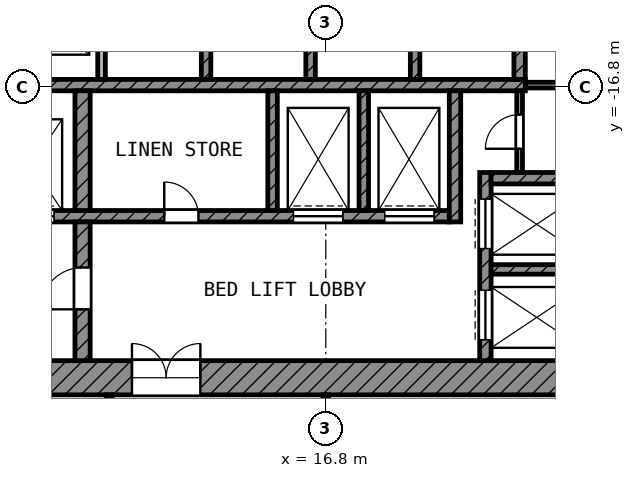
"""IFC4 building model, lengths in metres.
Left out: names, types, materials, properties, quantities, classifications, styles, units other than length and angle.
Written with IfcOpenShell. Run it as: python <this file> out.ifc"""

import sys

from ifc_helpers import new_model, si_unit, direction, frame, frame_2d, origin, place, context, subcontext, project, spatial, rectangle, extrude, element, fill, save


model = new_model("IFC4")
c1 = context("Model", 3, precision=1e-05, world=origin(), true_north=direction((0.0, 1.0)))
c2 = subcontext(c1, "Body", "Model", "MODEL_VIEW")
j1 = project(units=[si_unit("LENGTHUNIT", "METRE"), si_unit("PLANEANGLEUNIT", "RADIAN")], contexts=[c1])
p1 = place(None, origin())
s1 = spatial("IfcSite", under=j1, at=p1, CompositionType="ELEMENT")
p2 = place(p1, origin())
s2 = spatial("IfcBuilding", under=s1, at=p2, CompositionType="ELEMENT")
p3 = place(p2, frame((0.0, 0.0, 204.6)))
s3 = spatial("IfcBuildingStorey", under=s2, at=p3, CompositionType="ELEMENT", Elevation=204.6)
p4 = place(p3, frame((5.4, -24.45, 0.0), z_axis=(0.0, 0.0, 1.0), x_axis=(1.0, 0.0, 0.0)))
e1 = element("IfcWall", 1, at=p4, inside=s3, PredefinedType="SHEAR", context=c2, shape_type="SweptSolid", body=[
    extrude(rectangle(XDim=18.6, YDim=0.9, at=frame_2d((9.3, 0.0))), origin(), (0.0, 0.0, 1.0), 3.6),
])
p5 = place(p4, frame((6.3, 0.0, 0.0)))
e2 = element("IfcOpeningElement", 2, at=p5, cuts=e1, PredefinedType="OPENING", context=c2, shape_type="SweptSolid", body=[
    extrude(rectangle(XDim=1.8, YDim=2.1, at=frame_2d((0.9, 1.05))), frame((0.0, 0.46, 0.0), z_axis=(0.0, -1.0, 0.0), x_axis=(1.0, 0.0, 0.0)), (0.0, 0.0, 1.0), 0.92),
])
p6 = place(p3, frame((5.4, -16.75, 0.0), z_axis=(0.0, 0.0, 1.0), x_axis=(1.0, 0.0, 0.0)))
e3 = element("IfcWall", 3, at=p6, inside=s3, PredefinedType="SHEAR", context=c2, shape_type="SweptSolid", body=[
    extrude(rectangle(XDim=16.65, YDim=0.3, at=frame_2d((8.325, 0.0))), origin(), (0.0, 0.0, 1.0), 3.6),
])
p7 = place(p3, frame((5.4, -20.2, 0.0), z_axis=(0.0, 0.0, 1.0), x_axis=(1.0, 0.0, 0.0)))
e4 = element("IfcWall", 4, at=p7, inside=s3, PredefinedType="SHEAR", context=c2, shape_type="SweptSolid", body=[
    extrude(rectangle(XDim=14.65, YDim=0.3, at=frame_2d((7.325, 0.0))), origin(), (0.0, 0.0, 1.0), 3.6),
])
p8 = place(p7, frame((10.55, 0.0, 0.0)))
e5 = element("IfcOpeningElement", 5, at=p8, cuts=e4, PredefinedType="OPENING", context=c2, shape_type="SweptSolid", body=[
    extrude(rectangle(XDim=1.3, YDim=2.1, at=frame_2d((0.65, 1.05))), frame((0.0, 0.16, 0.0), z_axis=(0.0, -1.0, 0.0), x_axis=(1.0, 0.0, 0.0)), (0.0, 0.0, 1.0), 0.32),
])
p9 = place(p7, frame((12.95, 0.0, 0.0)))
e6 = element("IfcOpeningElement", 6, at=p9, cuts=e4, PredefinedType="OPENING", context=c2, shape_type="SweptSolid", body=[
    extrude(rectangle(XDim=1.3, YDim=2.1, at=frame_2d((0.65, 1.05))), frame((0.0, 0.16, 0.0), z_axis=(0.0, -1.0, 0.0), x_axis=(1.0, 0.0, 0.0)), (0.0, 0.0, 1.0), 0.32),
])
p10 = place(p7, frame((0.55, 0.0, 0.0)))
e7 = element("IfcOpeningElement", 7, at=p10, cuts=e4, PredefinedType="OPENING", context=c2, shape_type="SweptSolid", body=[
    extrude(rectangle(XDim=1.3, YDim=2.1, at=frame_2d((0.65, 1.05))), frame((0.0, 0.16, 0.0), z_axis=(0.0, -1.0, 0.0), x_axis=(1.0, 0.0, 0.0)), (0.0, 0.0, 1.0), 0.32),
])
p11 = place(p7, frame((2.95, 0.0, 0.0)))
e8 = element("IfcOpeningElement", 8, at=p11, cuts=e4, PredefinedType="OPENING", context=c2, shape_type="SweptSolid", body=[
    extrude(rectangle(XDim=1.3, YDim=2.1, at=frame_2d((0.65, 1.05))), frame((0.0, 0.16, 0.0), z_axis=(0.0, -1.0, 0.0), x_axis=(1.0, 0.0, 0.0)), (0.0, 0.0, 1.0), 0.32),
])
p12 = place(p7, frame((7.15, 0.0, 0.0)))
e9 = element("IfcOpeningElement", 9, at=p12, cuts=e4, PredefinedType="OPENING", context=c2, shape_type="SweptSolid", body=[
    extrude(rectangle(XDim=0.9, YDim=2.1, at=frame_2d((0.45, 1.05))), frame((0.0, 0.16, 0.0), z_axis=(0.0, -1.0, 0.0), x_axis=(1.0, 0.0, 0.0)), (0.0, 0.0, 1.0), 0.32),
])
p13 = place(p3, frame((10.4, -24.0, 0.0), z_axis=(0.0, 0.0, 1.0), x_axis=(0.0, 1.0, 0.0)))
e10 = element("IfcWall", 10, at=p13, inside=s3, PredefinedType="SHEAR", context=c2, shape_type="SweptSolid", body=[
    extrude(rectangle(XDim=3.65, YDim=0.4, at=frame_2d((1.825, 0.0))), origin(), (0.0, 0.0, 1.0), 3.6),
])
p14 = place(p13, frame((1.35, 0.0, 0.0)))
e11 = element("IfcOpeningElement", 11, at=p14, cuts=e10, PredefinedType="OPENING", context=c2, shape_type="SweptSolid", body=[
    extrude(rectangle(XDim=1.1, YDim=2.1, at=frame_2d((0.55, 1.05))), frame((0.0, 0.21, 0.0), z_axis=(0.0, -1.0, 0.0), x_axis=(1.0, 0.0, 0.0)), (0.0, 0.0, 1.0), 0.42),
])
p15 = place(p3, frame((10.4, -20.05, 0.0), z_axis=(0.0, 0.0, 1.0), x_axis=(0.0, 1.0, 0.0)))
e12 = element("IfcWall", 12, at=p15, inside=s3, PredefinedType="SHEAR", context=c2, shape_type="SweptSolid", body=[
    extrude(rectangle(XDim=3.15, YDim=0.4, at=frame_2d((1.575, 0.0))), origin(), (0.0, 0.0, 1.0), 3.6),
])
p16 = place(p3, frame((20.2, -20.35, 0.0), z_axis=(0.0, 0.0, 1.0), x_axis=(0.0, 1.0, 0.0)))
e13 = element("IfcWall", 13, at=p16, inside=s3, PredefinedType="SHEAR", context=c2, shape_type="SweptSolid", body=[
    extrude(rectangle(XDim=3.45, YDim=0.3, at=frame_2d((1.725, 0.0))), origin(), (0.0, 0.0, 1.0), 3.6),
])
p17 = place(p3, frame((21.9, -16.6, 0.0), z_axis=(0.0, 0.0, 1.0), x_axis=(0.0, 1.0, 0.0)))
e14 = element("IfcWall", 14, at=p17, inside=s3, PredefinedType="SHEAR", context=c2, shape_type="SweptSolid", body=[
    extrude(rectangle(XDim=2.35, YDim=0.3, at=frame_2d((1.175, 0.0))), origin(), (0.0, 0.0, 1.0), 3.6),
])
p18 = place(p3, frame((21.15, -19.2, 0.0), z_axis=(0.0, 0.0, 1.0), x_axis=(1.0, 0.0, 0.0)))
e15 = element("IfcWall", 15, at=p18, inside=s3, PredefinedType="SHEAR", context=c2, shape_type="SweptSolid", body=[
    extrude(rectangle(XDim=2.85, YDim=0.3, at=frame_2d((1.425, 0.0))), origin(), (0.0, 0.0, 1.0), 3.6),
])
p19 = place(p3, frame((21.0, -24.0, 0.0), z_axis=(0.0, 0.0, 1.0), x_axis=(0.0, 1.0, 0.0)))
e16 = element("IfcWall", 16, at=p19, inside=s3, PredefinedType="SHEAR", context=c2, shape_type="SweptSolid", body=[
    extrude(rectangle(XDim=4.95, YDim=0.3, at=frame_2d((2.475, 0.0))), origin(), (0.0, 0.0, 1.0), 3.6),
])
p20 = place(p19, frame((2.95, 0.0, 0.0)))
e17 = element("IfcOpeningElement", 17, at=p20, cuts=e16, PredefinedType="OPENING", context=c2, shape_type="SweptSolid", body=[
    extrude(rectangle(XDim=1.3, YDim=2.1, at=frame_2d((0.65, 1.05))), frame((0.0, 0.16, 0.0), z_axis=(0.0, -1.0, 0.0), x_axis=(1.0, 0.0, 0.0)), (0.0, 0.0, 1.0), 0.32),
])
p21 = place(p19, frame((0.55, 0.0, 0.0)))
e18 = element("IfcOpeningElement", 18, at=p21, cuts=e16, PredefinedType="OPENING", context=c2, shape_type="SweptSolid", body=[
    extrude(rectangle(XDim=1.3, YDim=2.1, at=frame_2d((0.65, 1.05))), frame((0.0, 0.16, 0.0), z_axis=(0.0, -1.0, 0.0), x_axis=(1.0, 0.0, 0.0)), (0.0, 0.0, 1.0), 0.32),
])
p22 = place(p3, frame((21.15, -21.6, 0.0), z_axis=(0.0, 0.0, 1.0), x_axis=(1.0, 0.0, 0.0)))
e19 = element("IfcWall", 19, at=p22, inside=s3, PredefinedType="SHEAR", context=c2, shape_type="SweptSolid", body=[
    extrude(rectangle(XDim=2.85, YDim=0.25, at=frame_2d((1.425, 0.0))), origin(), (0.0, 0.0, 1.0), 3.6),
])
for number, where, z_axis, x_axis in (
    (20, (15.4, -20.05, 0.0), (0.0, 0.0, 1.0), (0.0, 1.0, 0.0)),
    (21, (17.8, -20.05, 0.0), (0.0, 0.0, 1.0), (0.0, 1.0, 0.0)),
):
    element("IfcWall", number, at=place(p3, frame(where, z_axis=z_axis, x_axis=x_axis)), inside=s3, PredefinedType="SHEAR", context=c2, shape_type="SweptSolid", body=[
        extrude(rectangle(XDim=3.15, YDim=0.25, at=frame_2d((1.575, 0.0))), origin(), (0.0, 0.0, 1.0), 3.6),
    ])
p23 = place(p3, frame((10.9, -16.6, 0.0), z_axis=(0.0, 0.0, 1.0), x_axis=(0.0, 1.0, 0.0)))
e22 = element("IfcWall", 22, at=p23, inside=s3, PredefinedType="PARTITIONING", context=c2, shape_type="SweptSolid", body=[
    extrude(rectangle(XDim=2.35, YDim=0.2, at=frame_2d((1.175, 0.0))), origin(), (0.0, 0.0, 1.0), 3.6),
])
for number, where, z_axis, x_axis in (
    (23, (13.65, -16.6, 0.0), (0.0, 0.0, 1.0), (0.0, 1.0, 0.0)),
    (24, (16.4, -16.6, 0.0), (0.0, 0.0, 1.0), (0.0, 1.0, 0.0)),
    (25, (19.15, -16.6, 0.0), (0.0, 0.0, 1.0), (0.0, 1.0, 0.0)),
):
    element("IfcWall", number, at=place(p3, frame(where, z_axis=z_axis, x_axis=x_axis)), inside=s3, PredefinedType="SHEAR", context=c2, shape_type="SweptSolid", body=[
        extrude(rectangle(XDim=2.35, YDim=0.25, at=frame_2d((1.175, 0.0))), origin(), (0.0, 0.0, 1.0), 3.6),
    ])
p24 = place(p3, frame((21.9, -19.05, 0.0), z_axis=(0.0, 0.0, 1.0), x_axis=(0.0, 1.0, 0.0)))
e26 = element("IfcWall", 26, at=p24, inside=s3, PredefinedType="PARTITIONING", context=c2, shape_type="SweptSolid", body=[
    extrude(rectangle(XDim=2.15, YDim=0.15, at=frame_2d((1.075, 0.0))), origin(), (0.0, 0.0, 1.0), 3.6),
])
p25 = place(p24, frame((0.625, 0.0, 0.0)))
e27 = element("IfcOpeningElement", 27, at=p25, cuts=e26, PredefinedType="OPENING", context=c2, shape_type="SweptSolid", body=[
    extrude(rectangle(XDim=0.9, YDim=2.1, at=frame_2d((0.45, 1.05))), frame((0.0, 0.085, 0.0), z_axis=(0.0, -1.0, 0.0), x_axis=(1.0, 0.0, 0.0)), (0.0, 0.0, 1.0), 0.17),
])
p26 = place(p3, frame((22.05, -16.75, 0.0), z_axis=(0.0, 0.0, 1.0), x_axis=(1.0, 0.0, 0.0)))
e28 = element("IfcWall", 28, at=p26, inside=s3, PredefinedType="PARTITIONING", context=c2, shape_type="SweptSolid", body=[
    extrude(rectangle(XDim=1.95, YDim=0.15, at=frame_2d((0.975, 0.0))), origin(), (0.0, 0.0, 1.0), 3.6),
])
p27 = place(p3, frame((11.1, -29.399, 0.0), z_axis=(0.0, 0.0, 1.0), x_axis=(0.0, 1.0, 0.0)))
e29 = element("IfcWall", 29, at=p27, inside=s3, PredefinedType="PARTITIONING", context=c2, shape_type="SweptSolid", body=[
    extrude(rectangle(XDim=4.499, YDim=0.15, at=frame_2d((2.25, 0.0))), origin(), (0.0, 0.0, 1.0), 3.6),
])
p28 = place(p3, frame((16.8, -54.52, 0.0), z_axis=(0.0, 0.0, 1.0), x_axis=(0.0, 1.0, 0.0)))
e30 = element("IfcWall", 30, at=p28, inside=s3, PredefinedType="PARTITIONING", context=c2, shape_type="SweptSolid", body=[
    extrude(rectangle(XDim=29.62, YDim=0.15, at=frame_2d((14.81, 0.0))), origin(), (0.0, 0.0, 1.0), 3.6),
])
p29 = place(p28, frame((21.52, 0.0, 0.0)))
e31 = element("IfcOpeningElement", 31, at=p29, cuts=e30, PredefinedType="OPENING", context=c2, shape_type="SweptSolid", body=[
    extrude(rectangle(XDim=1.2, YDim=2.1, at=frame_2d((0.6, 1.05))), frame((0.0, 0.085, 0.0), z_axis=(0.0, -1.0, 0.0), x_axis=(1.0, 0.0, 0.0)), (0.0, 0.0, 1.0), 0.17),
])
p30 = place(p28, frame((10.76, 0.0, 0.0)))
e32 = element("IfcOpeningElement", 32, at=p30, cuts=e30, PredefinedType="OPENING", context=c2, shape_type="SweptSolid", body=[
    extrude(rectangle(XDim=1.2, YDim=2.1, at=frame_2d((0.6, 1.05))), frame((0.0, 0.085, 0.0), z_axis=(0.0, -1.0, 0.0), x_axis=(1.0, 0.0, 0.0)), (0.0, 0.0, 1.0), 0.17),
])
p31 = place(p28, frame((9.2, 0.0, 0.0)))
e33 = element("IfcOpeningElement", 33, at=p31, cuts=e30, PredefinedType="OPENING", context=c2, shape_type="SweptSolid", body=[
    extrude(rectangle(XDim=1.2, YDim=2.1, at=frame_2d((0.6, 1.05))), frame((0.0, 0.085, 0.0), z_axis=(0.0, -1.0, 0.0), x_axis=(1.0, 0.0, 0.0)), (0.0, 0.0, 1.0), 0.17),
])
p32 = place(p28, frame((7.99, 0.0, 0.0)))
e34 = element("IfcOpeningElement", 34, at=p32, cuts=e30, PredefinedType="OPENING", context=c2, shape_type="SweptSolid", body=[
    extrude(rectangle(XDim=0.9, YDim=2.1, at=frame_2d((0.45, 1.05))), frame((0.0, 0.085, 0.0), z_axis=(0.0, -1.0, 0.0), x_axis=(1.0, 0.0, 0.0)), (0.0, 0.0, 1.0), 0.17),
])
p33 = place(p28, frame((2.07, 0.0, 0.0)))
e35 = element("IfcOpeningElement", 35, at=p33, cuts=e30, PredefinedType="OPENING", context=c2, shape_type="SweptSolid", body=[
    extrude(rectangle(XDim=1.5, YDim=2.1, at=frame_2d((0.75, 1.05))), frame((0.0, 0.085, 0.0), z_axis=(0.0, -1.0, 0.0), x_axis=(1.0, 0.0, 0.0)), (0.0, 0.0, 1.0), 0.17),
])
p34 = place(p20, origin())
e36 = element("IfcDoor", 36, at=p34, inside=s3, OperationType="DOUBLE_DOOR_SLIDING", PredefinedType="DOOR", context=c2, shape_type="SweptSolid", body=[
    extrude(rectangle(XDim=1.3, YDim=2.1, at=frame_2d((0.65, 1.05))), frame((0.0, 0.025, 0.0), z_axis=(0.0, -1.0, 0.0), x_axis=(1.0, 0.0, 0.0)), (0.0, 0.0, 1.0), 0.05),
])
fill(e17, e36)
p35 = place(p21, origin())
e37 = element("IfcDoor", 37, at=p35, inside=s3, OperationType="DOUBLE_DOOR_SLIDING", PredefinedType="DOOR", context=c2, shape_type="SweptSolid", body=[
    extrude(rectangle(XDim=1.3, YDim=2.1, at=frame_2d((0.65, 1.05))), frame((0.0, 0.025, 0.0), z_axis=(0.0, -1.0, 0.0), x_axis=(1.0, 0.0, 0.0)), (0.0, 0.0, 1.0), 0.05),
])
fill(e18, e37)
p36 = place(p8, origin())
e38 = element("IfcDoor", 38, at=p36, inside=s3, OperationType="DOUBLE_DOOR_SLIDING", PredefinedType="DOOR", context=c2, shape_type="SweptSolid", body=[
    extrude(rectangle(XDim=1.3, YDim=2.1, at=frame_2d((0.65, 1.05))), frame((0.0, 0.025, 0.0), z_axis=(0.0, -1.0, 0.0), x_axis=(1.0, 0.0, 0.0)), (0.0, 0.0, 1.0), 0.05),
])
fill(e5, e38)
p37 = place(p9, origin())
e39 = element("IfcDoor", 39, at=p37, inside=s3, OperationType="DOUBLE_DOOR_SLIDING", PredefinedType="DOOR", context=c2, shape_type="SweptSolid", body=[
    extrude(rectangle(XDim=1.3, YDim=2.1, at=frame_2d((0.65, 1.05))), frame((0.0, 0.025, 0.0), z_axis=(0.0, -1.0, 0.0), x_axis=(1.0, 0.0, 0.0)), (0.0, 0.0, 1.0), 0.05),
])
fill(e6, e39)
p38 = place(p11, origin())
e40 = element("IfcDoor", 40, at=p38, inside=s3, OperationType="DOUBLE_DOOR_SLIDING", PredefinedType="DOOR", context=c2, shape_type="SweptSolid", body=[
    extrude(rectangle(XDim=1.3, YDim=2.1, at=frame_2d((0.65, 1.05))), frame((0.0, 0.025, 0.0), z_axis=(0.0, -1.0, 0.0), x_axis=(1.0, 0.0, 0.0)), (0.0, 0.0, 1.0), 0.05),
])
fill(e8, e40)
p39 = place(p14, origin())
e41 = element("IfcDoor", 41, at=p39, inside=s3, OperationType="SINGLE_SWING_LEFT", PredefinedType="DOOR", context=c2, shape_type="SweptSolid", body=[
    extrude(rectangle(XDim=1.1, YDim=2.1, at=frame_2d((0.55, 1.05))), frame((0.0, 0.025, 0.0), z_axis=(0.0, -1.0, 0.0), x_axis=(1.0, 0.0, 0.0)), (0.0, 0.0, 1.0), 0.05),
])
fill(e11, e41)
p40 = place(p5, origin())
e42 = element("IfcDoor", 42, at=p40, inside=s3, OperationType="DOUBLE_DOOR_SINGLE_SWING", PredefinedType="DOOR", context=c2, shape_type="SweptSolid", body=[
    extrude(rectangle(XDim=1.8, YDim=2.1, at=frame_2d((0.9, 1.05))), frame((0.0, 0.025, 0.0), z_axis=(0.0, -1.0, 0.0), x_axis=(1.0, 0.0, 0.0)), (0.0, 0.0, 1.0), 0.05),
])
fill(e2, e42)
p41 = place(p25, origin())
e43 = element("IfcDoor", 43, at=p41, inside=s3, OperationType="SINGLE_SWING_LEFT", PredefinedType="DOOR", context=c2, shape_type="SweptSolid", body=[
    extrude(rectangle(XDim=0.9, YDim=2.1, at=frame_2d((0.45, 1.05))), frame((0.0, 0.025, 0.0), z_axis=(0.0, -1.0, 0.0), x_axis=(1.0, 0.0, 0.0)), (0.0, 0.0, 1.0), 0.05),
])
fill(e27, e43)
p42 = place(p12, origin())
e44 = element("IfcDoor", 44, at=p42, inside=s3, OperationType="SINGLE_SWING_LEFT", PredefinedType="DOOR", context=c2, shape_type="SweptSolid", body=[
    extrude(rectangle(XDim=0.9, YDim=2.1, at=frame_2d((0.45, 1.05))), frame((0.0, 0.025, 0.0), z_axis=(0.0, -1.0, 0.0), x_axis=(1.0, 0.0, 0.0)), (0.0, 0.0, 1.0), 0.05),
])
fill(e9, e44)
save(model, sys.argv[1])
